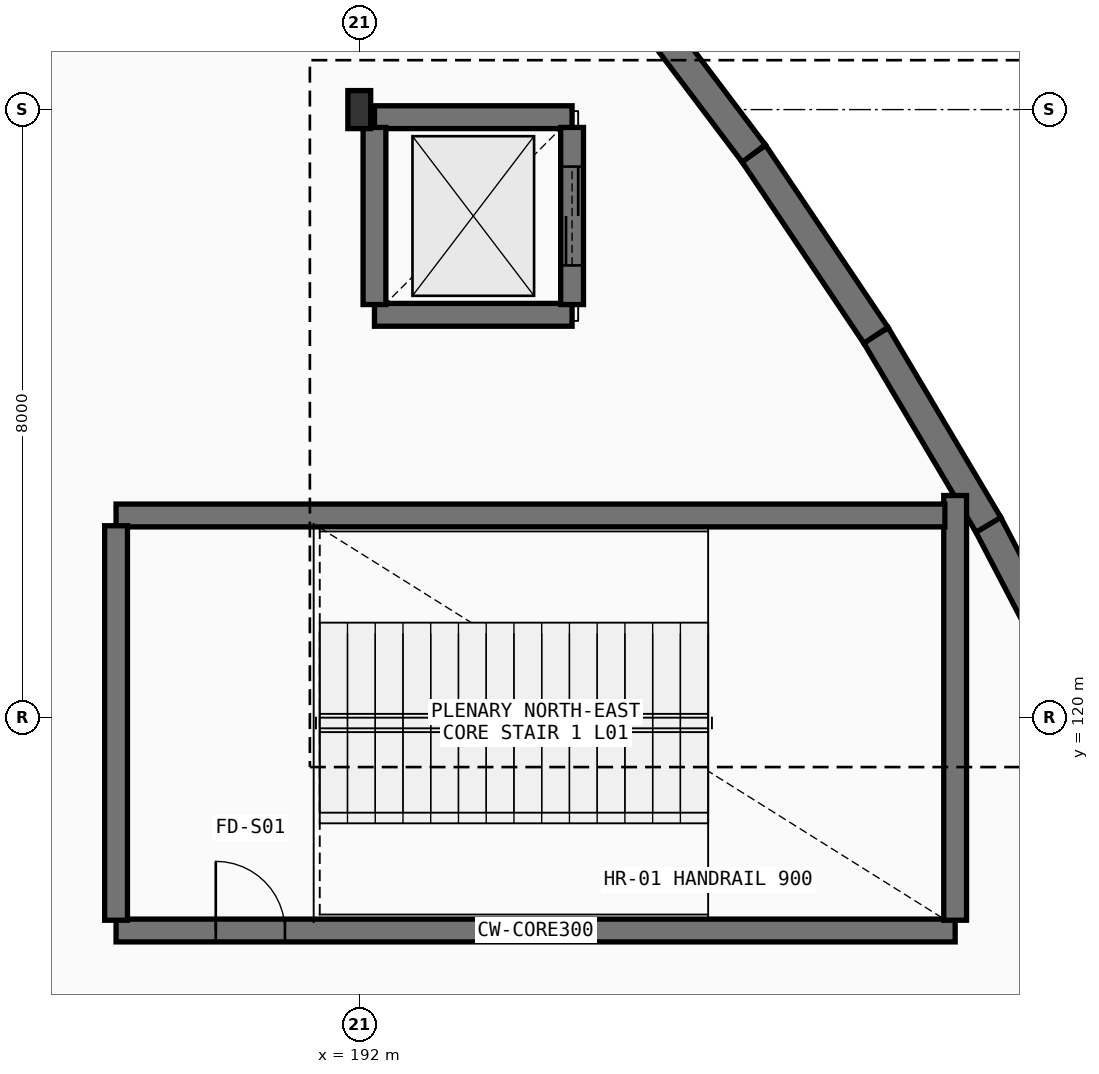
"""IFC4 building model, lengths in metres.
Left out: names, types, materials, properties, quantities, classifications, styles, units other than length and angle.
Written with IfcOpenShell. Run it as: python <this file> out.ifc"""

import sys

from ifc_helpers import new_model, si_unit, direction, frame, frame_2d, origin, origin_2d, place, context, subcontext, project, spatial, rectangle, i_section, extrude, element, fill, save


model = new_model("IFC4")
c1 = context("Model", 3, precision=1e-05, world=origin(), true_north=direction((0.0, 1.0)))
c2 = subcontext(c1, "Body", "Model", "MODEL_VIEW")
j1 = project(units=[si_unit("LENGTHUNIT", "METRE"), si_unit("PLANEANGLEUNIT", "RADIAN")], contexts=[c1])
p1 = place(None, origin())
s1 = spatial("IfcSite", under=j1, at=p1, CompositionType="ELEMENT")
p2 = place(p1, origin())
s2 = spatial("IfcBuilding", under=s1, at=p2, CompositionType="ELEMENT")
p3 = place(p2, frame((0.0, 0.0, 6.0)))
s3 = spatial("IfcBuildingStorey", under=s2, at=p3, CompositionType="ELEMENT", Elevation=6.0)
p4 = place(p3, frame((192.0, 128.0, 0.0), z_axis=(0.0, 0.0, 1.0), x_axis=(1.0, 0.0, 0.0)))
e1 = element("IfcColumn", 1, at=p4, inside=s3, PredefinedType="COLUMN", context=c2, shape_type="SweptSolid", body=[
    extrude(i_section(OverallWidth=0.3, OverallDepth=0.5, WebThickness=0.014, FlangeThickness=0.028, FilletRadius=0.027, at=origin_2d()), origin(), (0.0, 0.0, 1.0), 5.4),
])
p5 = place(p3, frame((201.6, 120.0, 0.0), z_axis=(0.0, 0.0, 1.0), x_axis=(-0.462438550367, 0.886651333465, 0.0)))
e2 = element("IfcWall", 2, at=p5, inside=s3, PredefinedType="SOLIDWALL", context=c2, shape_type="SweptSolid", body=[
    extrude(rectangle(XDim=2.88, YDim=0.38, at=frame_2d((1.44, 0.0))), origin(), (0.0, 0.0, 1.0), 4.9),
])
p6 = place(p3, frame((200.278, 122.537, 0.0), z_axis=(0.0, 0.0, 1.0), x_axis=(-0.510616534419, 0.859808557051, 0.0)))
e3 = element("IfcWall", 3, at=p6, inside=s3, PredefinedType="SOLIDWALL", context=c2, shape_type="SweptSolid", body=[
    extrude(rectangle(XDim=2.901, YDim=0.38, at=frame_2d((1.45, 0.0))), origin(), (0.0, 0.0, 1.0), 4.9),
])
p7 = place(p3, frame((198.797, 125.031, 0.0), z_axis=(0.0, 0.0, 1.0), x_axis=(-0.55768775085, 0.830050825282, 0.0)))
e4 = element("IfcWall", 4, at=p7, inside=s3, PredefinedType="SOLIDWALL", context=c2, shape_type="SweptSolid", body=[
    extrude(rectangle(XDim=2.882, YDim=0.38, at=frame_2d((1.441, 0.0))), origin(), (0.0, 0.0, 1.0), 4.9),
])
p8 = place(p3, frame((197.19, 127.423, 0.0), z_axis=(0.0, 0.0, 1.0), x_axis=(-0.602763527755, 0.797919876685, 0.0)))
e5 = element("IfcWall", 5, at=p8, inside=s3, PredefinedType="SOLIDWALL", context=c2, shape_type="SweptSolid", body=[
    extrude(rectangle(XDim=2.88, YDim=0.38, at=frame_2d((1.44, 0.0))), origin(), (0.0, 0.0, 1.0), 4.9),
])
p9 = place(p3, frame((188.8, 117.2, 0.0), z_axis=(0.0, 0.0, 1.0), x_axis=(1.0, 0.0, 0.0)))
e6 = element("IfcWall", 6, at=p9, inside=s3, PredefinedType="SHEAR", context=c2, shape_type="SweptSolid", body=[
    extrude(rectangle(XDim=11.04, YDim=0.3, at=frame_2d((5.52, 0.0))), origin(), (0.0, 0.0, 1.0), 5.04),
])
p10 = place(p9, frame((1.312, 0.0, 0.0)))
e7 = element("IfcOpeningElement", 7, at=p10, cuts=e6, PredefinedType="OPENING", context=c2, shape_type="SweptSolid", body=[
    extrude(rectangle(XDim=0.91, YDim=2.08, at=frame_2d((0.455, 1.04))), frame((0.0, 0.16, 0.0), z_axis=(0.0, -1.0, 0.0), x_axis=(1.0, 0.0, 0.0)), (0.0, 0.0, 1.0), 0.32),
])
p11 = place(p3, frame((199.84, 117.335, 0.0), z_axis=(0.0, 0.0, 1.0), x_axis=(0.0, 1.0, 0.0)))
e8 = element("IfcWall", 8, at=p11, inside=s3, PredefinedType="SHEAR", context=c2, shape_type="SweptSolid", body=[
    extrude(rectangle(XDim=5.588, YDim=0.3, at=frame_2d((2.794, 0.0))), origin(), (0.0, 0.0, 1.0), 5.04),
])
p12 = place(p3, frame((199.705, 122.66, 0.0), z_axis=(0.0, 0.0, 1.0), x_axis=(-1.0, 0.0, 0.0)))
e9 = element("IfcWall", 9, at=p12, inside=s3, PredefinedType="SHEAR", context=c2, shape_type="SweptSolid", body=[
    extrude(rectangle(XDim=10.905, YDim=0.3, at=frame_2d((5.453, 0.0))), origin(), (0.0, 0.0, 1.0), 5.04),
])
p13 = place(p3, frame((188.8, 122.525, 0.0), z_axis=(0.0, 0.0, 1.0), x_axis=(0.0, -1.0, 0.0)))
e10 = element("IfcWall", 10, at=p13, inside=s3, PredefinedType="SHEAR", context=c2, shape_type="SweptSolid", body=[
    extrude(rectangle(XDim=5.19, YDim=0.3, at=frame_2d((2.595, 0.0))), origin(), (0.0, 0.0, 1.0), 5.04),
])
p14 = place(p3, frame((194.8, 127.9, 0.0), z_axis=(0.0, 0.0, 1.0), x_axis=(-1.0, 0.0, 0.0)))
e11 = element("IfcWall", 11, at=p14, inside=s3, PredefinedType="SHEAR", context=c2, shape_type="SweptSolid", body=[
    extrude(rectangle(XDim=2.6, YDim=0.3, at=frame_2d((1.3, 0.0))), origin(), (0.0, 0.0, 1.0), 5.17),
])
p15 = place(p3, frame((192.2, 125.3, 0.0), z_axis=(0.0, 0.0, 1.0), x_axis=(1.0, 0.0, 0.0)))
e12 = element("IfcWall", 12, at=p15, inside=s3, PredefinedType="SHEAR", context=c2, shape_type="SweptSolid", body=[
    extrude(rectangle(XDim=2.6, YDim=0.3, at=frame_2d((1.3, 0.0))), origin(), (0.0, 0.0, 1.0), 5.04),
])
p16 = place(p3, frame((194.8, 125.435, 0.0), z_axis=(0.0, 0.0, 1.0), x_axis=(0.0, 1.0, 0.0)))
e13 = element("IfcWall", 13, at=p16, inside=s3, PredefinedType="SHEAR", context=c2, shape_type="SweptSolid", body=[
    extrude(rectangle(XDim=2.33, YDim=0.3, at=frame_2d((1.165, 0.0))), origin(), (0.0, 0.0, 1.0), 5.04),
])
p17 = place(p16, frame((0.515, 0.0, 0.0)))
e14 = element("IfcOpeningElement", 14, at=p17, cuts=e13, PredefinedType="OPENING", context=c2, shape_type="SweptSolid", body=[
    extrude(rectangle(XDim=1.3, YDim=2.22, at=frame_2d((0.65, 1.11))), frame((0.0, 0.16, 0.0), z_axis=(0.0, -1.0, 0.0), x_axis=(1.0, 0.0, 0.0)), (0.0, 0.0, 1.0), 0.32),
])
p18 = place(p3, frame((192.2, 127.765, 0.0), z_axis=(0.0, 0.0, 1.0), x_axis=(0.0, -1.0, 0.0)))
e15 = element("IfcWall", 15, at=p18, inside=s3, PredefinedType="SHEAR", context=c2, shape_type="SweptSolid", body=[
    extrude(rectangle(XDim=2.33, YDim=0.3, at=frame_2d((1.165, 0.0))), origin(), (0.0, 0.0, 1.0), 5.04),
])
p19 = place(p10, origin())
e16 = element("IfcDoor", 16, at=p19, inside=s3, OperationType="SINGLE_SWING_RIGHT", PredefinedType="DOOR", context=c2, shape_type="SweptSolid", body=[
    extrude(rectangle(XDim=0.91, YDim=2.08, at=frame_2d((0.455, 1.04))), frame((0.0, 0.025, 0.0), z_axis=(0.0, -1.0, 0.0), x_axis=(1.0, 0.0, 0.0)), (0.0, 0.0, 1.0), 0.05),
])
fill(e7, e16)
p20 = place(p17, origin())
e17 = element("IfcDoor", 17, at=p20, inside=s3, OperationType="DOUBLE_DOOR_SLIDING", PredefinedType="DOOR", context=c2, shape_type="SweptSolid", body=[
    extrude(rectangle(XDim=1.3, YDim=2.22, at=frame_2d((0.65, 1.11))), frame((0.0, 0.025, 0.0), z_axis=(0.0, -1.0, 0.0), x_axis=(1.0, 0.0, 0.0)), (0.0, 0.0, 1.0), 0.05),
])
fill(e14, e17)
save(model, sys.argv[1])
